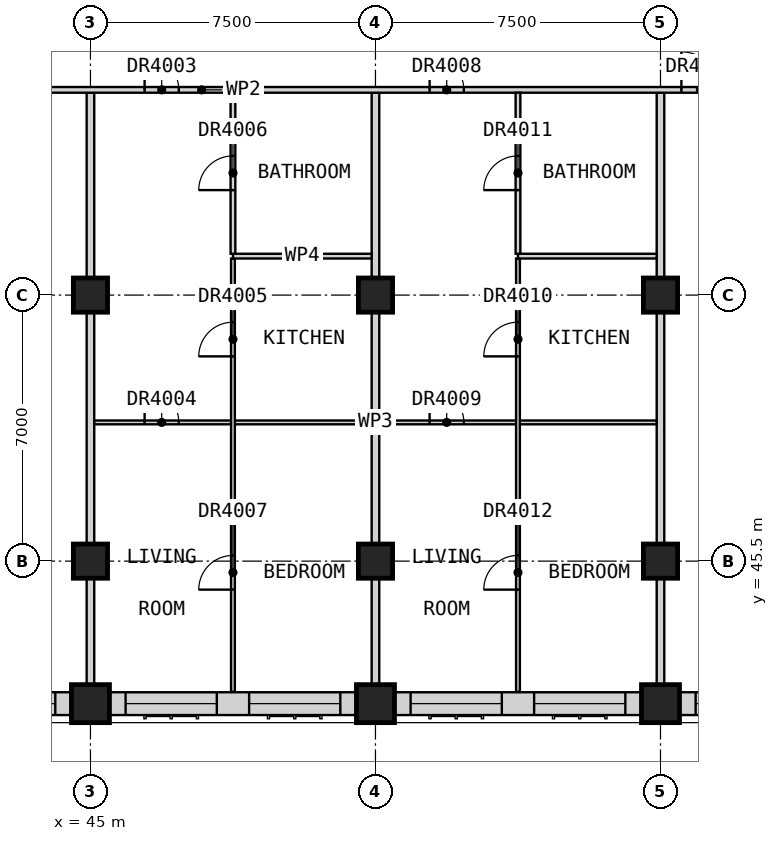
"""IFC4 building model, lengths in metres.
Left out: names, types, materials, properties, quantities, classifications, styles, units other than length and angle.
Written with IfcOpenShell. Run it as: python <this file> out.ifc"""

import sys

from ifc_helpers import new_model, si_unit, direction, frame, frame_2d, origin, origin_2d, place, context, subcontext, project, spatial, rectangle, extrude, element, fill, save


model = new_model("IFC4")
c1 = context("Model", 3, precision=1e-05, world=origin(), true_north=direction((0.0, 1.0)))
c2 = subcontext(c1, "Body", "Model", "MODEL_VIEW")
j1 = project(units=[si_unit("LENGTHUNIT", "METRE"), si_unit("PLANEANGLEUNIT", "RADIAN")], contexts=[c1])
p1 = place(None, origin())
s1 = spatial("IfcSite", under=j1, at=p1, CompositionType="ELEMENT")
p2 = place(p1, origin())
s2 = spatial("IfcBuilding", under=s1, at=p2, CompositionType="ELEMENT")
p3 = place(p2, frame((0.0, 0.0, 189.7)))
s3 = spatial("IfcBuildingStorey", under=s2, at=p3, CompositionType="ELEMENT", Elevation=189.7)
for number, where, z_axis, x_axis in (
    (1, (45.0, 41.75, 0.0), (0.0, 0.0, 1.0), (1.0, 0.0, 0.0)),
    (2, (52.5, 41.75, 0.0), (0.0, 0.0, 1.0), (1.0, 0.0, 0.0)),
    (3, (60.0, 41.75, 0.0), (0.0, 0.0, 1.0), (1.0, 0.0, 0.0)),
):
    element("IfcColumn", number, at=place(p3, frame(where, z_axis=z_axis, x_axis=x_axis)), inside=s3, PredefinedType="COLUMN", context=c2, shape_type="SweptSolid", body=[
        extrude(rectangle(XDim=1.0, YDim=1.0, at=origin_2d()), origin(), (0.0, 0.0, 1.0), 3.5),
    ])
for number, where, z_axis, x_axis in (
    (4, (45.0, 45.5, 0.0), (0.0, 0.0, 1.0), (1.0, 0.0, 0.0)),
    (5, (45.0, 52.5, 0.0), (0.0, 0.0, 1.0), (1.0, 0.0, 0.0)),
    (6, (52.5, 45.5, 0.0), (0.0, 0.0, 1.0), (1.0, 0.0, 0.0)),
    (7, (52.5, 52.5, 0.0), (0.0, 0.0, 1.0), (1.0, 0.0, 0.0)),
    (8, (60.0, 45.5, 0.0), (0.0, 0.0, 1.0), (1.0, 0.0, 0.0)),
    (9, (60.0, 52.5, 0.0), (0.0, 0.0, 1.0), (1.0, 0.0, 0.0)),
):
    element("IfcColumn", number, at=place(p3, frame(where, z_axis=z_axis, x_axis=x_axis)), inside=s3, PredefinedType="COLUMN", context=c2, shape_type="SweptSolid", body=[
        extrude(rectangle(XDim=0.9, YDim=0.9, at=origin_2d()), origin(), (0.0, 0.0, 1.0), 3.5),
    ])
p4 = place(p3, frame((38.0, 41.75, 0.0), z_axis=(0.0, 0.0, 1.0), x_axis=(1.0, 0.0, 0.0)))
e10 = element("IfcWall", 10, at=p4, inside=s3, PredefinedType="SOLIDWALL", context=c2, shape_type="SweptSolid", body=[
    extrude(rectangle(XDim=6.5, YDim=0.6, at=frame_2d((3.25, 0.0))), origin(), (0.0, 0.0, 1.0), 2.75),
])
p5 = place(p4, frame((0.425, 0.0, 0.8)))
e11 = element("IfcOpeningElement", 11, at=p5, cuts=e10, PredefinedType="OPENING", context=c2, shape_type="SweptSolid", body=[
    extrude(rectangle(XDim=2.4, YDim=1.8, at=frame_2d((1.2, 0.9))), frame((0.0, 0.31, 0.0), z_axis=(0.0, -1.0, 0.0), x_axis=(1.0, 0.0, 0.0)), (0.0, 0.0, 1.0), 0.62),
])
p6 = place(p4, frame((3.675, 0.0, 0.8)))
e12 = element("IfcOpeningElement", 12, at=p6, cuts=e10, PredefinedType="OPENING", context=c2, shape_type="SweptSolid", body=[
    extrude(rectangle(XDim=2.4, YDim=1.8, at=frame_2d((1.2, 0.9))), frame((0.0, 0.31, 0.0), z_axis=(0.0, -1.0, 0.0), x_axis=(1.0, 0.0, 0.0)), (0.0, 0.0, 1.0), 0.62),
])
p7 = place(p3, frame((45.5, 41.75, 0.0), z_axis=(0.0, 0.0, 1.0), x_axis=(1.0, 0.0, 0.0)))
e13 = element("IfcWall", 13, at=p7, inside=s3, PredefinedType="SOLIDWALL", context=c2, shape_type="SweptSolid", body=[
    extrude(rectangle(XDim=6.5, YDim=0.6, at=frame_2d((3.25, 0.0))), origin(), (0.0, 0.0, 1.0), 2.75),
])
p8 = place(p7, frame((0.425, 0.0, 0.8)))
e14 = element("IfcOpeningElement", 14, at=p8, cuts=e13, PredefinedType="OPENING", context=c2, shape_type="SweptSolid", body=[
    extrude(rectangle(XDim=2.4, YDim=1.8, at=frame_2d((1.2, 0.9))), frame((0.0, 0.31, 0.0), z_axis=(0.0, -1.0, 0.0), x_axis=(1.0, 0.0, 0.0)), (0.0, 0.0, 1.0), 0.62),
])
p9 = place(p7, frame((3.675, 0.0, 0.8)))
e15 = element("IfcOpeningElement", 15, at=p9, cuts=e13, PredefinedType="OPENING", context=c2, shape_type="SweptSolid", body=[
    extrude(rectangle(XDim=2.4, YDim=1.8, at=frame_2d((1.2, 0.9))), frame((0.0, 0.31, 0.0), z_axis=(0.0, -1.0, 0.0), x_axis=(1.0, 0.0, 0.0)), (0.0, 0.0, 1.0), 0.62),
])
p10 = place(p3, frame((53.0, 41.75, 0.0), z_axis=(0.0, 0.0, 1.0), x_axis=(1.0, 0.0, 0.0)))
e16 = element("IfcWall", 16, at=p10, inside=s3, PredefinedType="SOLIDWALL", context=c2, shape_type="SweptSolid", body=[
    extrude(rectangle(XDim=6.5, YDim=0.6, at=frame_2d((3.25, 0.0))), origin(), (0.0, 0.0, 1.0), 2.75),
])
p11 = place(p10, frame((0.425, 0.0, 0.8)))
e17 = element("IfcOpeningElement", 17, at=p11, cuts=e16, PredefinedType="OPENING", context=c2, shape_type="SweptSolid", body=[
    extrude(rectangle(XDim=2.4, YDim=1.8, at=frame_2d((1.2, 0.9))), frame((0.0, 0.31, 0.0), z_axis=(0.0, -1.0, 0.0), x_axis=(1.0, 0.0, 0.0)), (0.0, 0.0, 1.0), 0.62),
])
p12 = place(p10, frame((3.675, 0.0, 0.8)))
e18 = element("IfcOpeningElement", 18, at=p12, cuts=e16, PredefinedType="OPENING", context=c2, shape_type="SweptSolid", body=[
    extrude(rectangle(XDim=2.4, YDim=1.8, at=frame_2d((1.2, 0.9))), frame((0.0, 0.31, 0.0), z_axis=(0.0, -1.0, 0.0), x_axis=(1.0, 0.0, 0.0)), (0.0, 0.0, 1.0), 0.62),
])
p13 = place(p3, frame((60.5, 41.75, 0.0), z_axis=(0.0, 0.0, 1.0), x_axis=(1.0, 0.0, 0.0)))
e19 = element("IfcWall", 19, at=p13, inside=s3, PredefinedType="SOLIDWALL", context=c2, shape_type="SweptSolid", body=[
    extrude(rectangle(XDim=6.5, YDim=0.6, at=frame_2d((3.25, 0.0))), origin(), (0.0, 0.0, 1.0), 2.75),
])
p14 = place(p13, frame((0.425, 0.0, 0.8)))
e20 = element("IfcOpeningElement", 20, at=p14, cuts=e19, PredefinedType="OPENING", context=c2, shape_type="SweptSolid", body=[
    extrude(rectangle(XDim=2.4, YDim=1.8, at=frame_2d((1.2, 0.9))), frame((0.0, 0.31, 0.0), z_axis=(0.0, -1.0, 0.0), x_axis=(1.0, 0.0, 0.0)), (0.0, 0.0, 1.0), 0.62),
])
p15 = place(p13, frame((3.675, 0.0, 0.8)))
e21 = element("IfcOpeningElement", 21, at=p15, cuts=e19, PredefinedType="OPENING", context=c2, shape_type="SweptSolid", body=[
    extrude(rectangle(XDim=2.4, YDim=1.8, at=frame_2d((1.2, 0.9))), frame((0.0, 0.31, 0.0), z_axis=(0.0, -1.0, 0.0), x_axis=(1.0, 0.0, 0.0)), (0.0, 0.0, 1.0), 0.62),
])
for number, where, z_axis, x_axis in (
    (22, (45.0, 41.25, 0.0), (0.0, 0.0, 1.0), (0.0, 1.0, 0.0)),
    (23, (52.5, 41.25, 0.0), (0.0, 0.0, 1.0), (0.0, 1.0, 0.0)),
    (24, (60.0, 41.25, 0.0), (0.0, 0.0, 1.0), (0.0, 1.0, 0.0)),
):
    element("IfcWall", number, at=place(p3, frame(where, z_axis=z_axis, x_axis=x_axis)), inside=s3, PredefinedType="PARTITIONING", context=c2, shape_type="SweptSolid", body=[
        extrude(rectangle(XDim=16.575, YDim=0.2, at=frame_2d((8.288, 0.0))), origin(), (0.0, 0.0, 1.0), 3.25),
    ])
p16 = place(p3, frame((33.75, 57.9, 0.0), z_axis=(0.0, 0.0, 1.0), x_axis=(1.0, 0.0, 0.0)))
e25 = element("IfcWall", 25, at=p16, inside=s3, PredefinedType="PARTITIONING", context=c2, shape_type="SweptSolid", body=[
    extrude(rectangle(XDim=28.35, YDim=0.15, at=frame_2d((14.175, 0.0))), origin(), (0.0, 0.0, 1.0), 3.25),
])
p17 = place(p16, frame((5.125, 0.0, 0.0)))
e26 = element("IfcOpeningElement", 26, at=p17, cuts=e25, PredefinedType="OPENING", context=c2, shape_type="SweptSolid", body=[
    extrude(rectangle(XDim=1.0, YDim=2.1, at=frame_2d((0.5, 1.05))), frame((0.0, 0.085, 0.0), z_axis=(0.0, -1.0, 0.0), x_axis=(1.0, 0.0, 0.0)), (0.0, 0.0, 1.0), 0.17),
])
p18 = place(p16, frame((12.675, 0.0, 0.0)))
e27 = element("IfcOpeningElement", 27, at=p18, cuts=e25, PredefinedType="OPENING", context=c2, shape_type="SweptSolid", body=[
    extrude(rectangle(XDim=0.9, YDim=2.1, at=frame_2d((0.45, 1.05))), frame((0.0, 0.085, 0.0), z_axis=(0.0, -1.0, 0.0), x_axis=(1.0, 0.0, 0.0)), (0.0, 0.0, 1.0), 0.17),
])
p19 = place(p16, frame((20.175, 0.0, 0.0)))
e28 = element("IfcOpeningElement", 28, at=p19, cuts=e25, PredefinedType="OPENING", context=c2, shape_type="SweptSolid", body=[
    extrude(rectangle(XDim=0.9, YDim=2.1, at=frame_2d((0.45, 1.05))), frame((0.0, 0.085, 0.0), z_axis=(0.0, -1.0, 0.0), x_axis=(1.0, 0.0, 0.0)), (0.0, 0.0, 1.0), 0.17),
])
p20 = place(p16, frame((26.8, 0.0, 0.0)))
e29 = element("IfcOpeningElement", 29, at=p20, cuts=e25, PredefinedType="OPENING", context=c2, shape_type="SweptSolid", body=[
    extrude(rectangle(XDim=1.0, YDim=2.1, at=frame_2d((0.5, 1.05))), frame((0.0, 0.085, 0.0), z_axis=(0.0, -1.0, 0.0), x_axis=(1.0, 0.0, 0.0)), (0.0, 0.0, 1.0), 0.17),
])
p21 = place(p3, frame((45.1, 49.15, 0.0), z_axis=(0.0, 0.0, 1.0), x_axis=(1.0, 0.0, 0.0)))
e30 = element("IfcWall", 30, at=p21, inside=s3, PredefinedType="PARTITIONING", context=c2, shape_type="SweptSolid", body=[
    extrude(rectangle(XDim=14.8, YDim=0.1, at=frame_2d((7.4, 0.0))), origin(), (0.0, 0.0, 1.0), 3.25),
])
p22 = place(p21, frame((1.325, 0.0, 0.0)))
e31 = element("IfcOpeningElement", 31, at=p22, cuts=e30, PredefinedType="OPENING", context=c2, shape_type="SweptSolid", body=[
    extrude(rectangle(XDim=0.9, YDim=2.1, at=frame_2d((0.45, 1.05))), frame((0.0, 0.06, 0.0), z_axis=(0.0, -1.0, 0.0), x_axis=(1.0, 0.0, 0.0)), (0.0, 0.0, 1.0), 0.12),
])
p23 = place(p21, frame((8.825, 0.0, 0.0)))
e32 = element("IfcOpeningElement", 32, at=p23, cuts=e30, PredefinedType="OPENING", context=c2, shape_type="SweptSolid", body=[
    extrude(rectangle(XDim=0.9, YDim=2.1, at=frame_2d((0.45, 1.05))), frame((0.0, 0.06, 0.0), z_axis=(0.0, -1.0, 0.0), x_axis=(1.0, 0.0, 0.0)), (0.0, 0.0, 1.0), 0.12),
])
p24 = place(p3, frame((48.75, 42.06, 0.0), z_axis=(0.0, 0.0, 1.0), x_axis=(0.0, 1.0, 0.0)))
e33 = element("IfcWall", 33, at=p24, inside=s3, PredefinedType="PARTITIONING", context=c2, shape_type="SweptSolid", body=[
    extrude(rectangle(XDim=11.402, YDim=0.1, at=frame_2d((5.701, 0.0))), origin(), (0.0, 0.0, 1.0), 3.25),
])
p25 = place(p24, frame((8.827, 0.0, 0.0)))
e34 = element("IfcOpeningElement", 34, at=p25, cuts=e33, PredefinedType="OPENING", context=c2, shape_type="SweptSolid", body=[
    extrude(rectangle(XDim=0.9, YDim=2.1, at=frame_2d((0.45, 1.05))), frame((0.0, 0.06, 0.0), z_axis=(0.0, -1.0, 0.0), x_axis=(1.0, 0.0, 0.0)), (0.0, 0.0, 1.0), 0.12),
])
p26 = place(p24, frame((2.69, 0.0, 0.0)))
e35 = element("IfcOpeningElement", 35, at=p26, cuts=e33, PredefinedType="OPENING", context=c2, shape_type="SweptSolid", body=[
    extrude(rectangle(XDim=0.9, YDim=2.1, at=frame_2d((0.45, 1.05))), frame((0.0, 0.06, 0.0), z_axis=(0.0, -1.0, 0.0), x_axis=(1.0, 0.0, 0.0)), (0.0, 0.0, 1.0), 0.12),
])
p27 = place(p3, frame((56.25, 42.06, 0.0), z_axis=(0.0, 0.0, 1.0), x_axis=(0.0, 1.0, 0.0)))
e36 = element("IfcWall", 36, at=p27, inside=s3, PredefinedType="PARTITIONING", context=c2, shape_type="SweptSolid", body=[
    extrude(rectangle(XDim=11.402, YDim=0.1, at=frame_2d((5.701, 0.0))), origin(), (0.0, 0.0, 1.0), 3.25),
])
p28 = place(p27, frame((8.827, 0.0, 0.0)))
e37 = element("IfcOpeningElement", 37, at=p28, cuts=e36, PredefinedType="OPENING", context=c2, shape_type="SweptSolid", body=[
    extrude(rectangle(XDim=0.9, YDim=2.1, at=frame_2d((0.45, 1.05))), frame((0.0, 0.06, 0.0), z_axis=(0.0, -1.0, 0.0), x_axis=(1.0, 0.0, 0.0)), (0.0, 0.0, 1.0), 0.12),
])
p29 = place(p27, frame((2.69, 0.0, 0.0)))
e38 = element("IfcOpeningElement", 38, at=p29, cuts=e36, PredefinedType="OPENING", context=c2, shape_type="SweptSolid", body=[
    extrude(rectangle(XDim=0.9, YDim=2.1, at=frame_2d((0.45, 1.05))), frame((0.0, 0.06, 0.0), z_axis=(0.0, -1.0, 0.0), x_axis=(1.0, 0.0, 0.0)), (0.0, 0.0, 1.0), 0.12),
])
for number, where, z_axis, x_axis in (
    (39, (48.75, 53.525, 0.0), (0.0, 0.0, 1.0), (1.0, 0.0, 0.0)),
    (40, (56.25, 53.525, 0.0), (0.0, 0.0, 1.0), (1.0, 0.0, 0.0)),
):
    element("IfcWall", number, at=place(p3, frame(where, z_axis=z_axis, x_axis=x_axis)), inside=s3, PredefinedType="PARTITIONING", context=c2, shape_type="SweptSolid", body=[
        extrude(rectangle(XDim=3.65, YDim=0.125, at=frame_2d((1.825, 0.0))), origin(), (0.0, 0.0, 1.0), 3.25),
    ])
p30 = place(p3, frame((48.75, 53.587, 0.0), z_axis=(0.0, 0.0, 1.0), x_axis=(0.0, 1.0, 0.0)))
e41 = element("IfcWall", 41, at=p30, inside=s3, PredefinedType="PARTITIONING", context=c2, shape_type="SweptSolid", body=[
    extrude(rectangle(XDim=4.238, YDim=0.125, at=frame_2d((2.119, 0.0))), origin(), (0.0, 0.0, 1.0), 3.25),
])
p31 = place(p30, frame((1.675, 0.0, 0.0)))
e42 = element("IfcOpeningElement", 42, at=p31, cuts=e41, PredefinedType="OPENING", context=c2, shape_type="SweptSolid", body=[
    extrude(rectangle(XDim=0.9, YDim=2.1, at=frame_2d((0.45, 1.05))), frame((0.0, 0.073, 0.0), z_axis=(0.0, -1.0, 0.0), x_axis=(1.0, 0.0, 0.0)), (0.0, 0.0, 1.0), 0.145),
])
p32 = place(p3, frame((56.25, 53.587, 0.0), z_axis=(0.0, 0.0, 1.0), x_axis=(0.0, 1.0, 0.0)))
e43 = element("IfcWall", 43, at=p32, inside=s3, PredefinedType="PARTITIONING", context=c2, shape_type="SweptSolid", body=[
    extrude(rectangle(XDim=4.238, YDim=0.125, at=frame_2d((2.119, 0.0))), origin(), (0.0, 0.0, 1.0), 3.25),
])
p33 = place(p32, frame((1.675, 0.0, 0.0)))
e44 = element("IfcOpeningElement", 44, at=p33, cuts=e43, PredefinedType="OPENING", context=c2, shape_type="SweptSolid", body=[
    extrude(rectangle(XDim=0.9, YDim=2.1, at=frame_2d((0.45, 1.05))), frame((0.0, 0.073, 0.0), z_axis=(0.0, -1.0, 0.0), x_axis=(1.0, 0.0, 0.0)), (0.0, 0.0, 1.0), 0.145),
])
p34 = place(p6, origin())
e45 = element("IfcWindow", 45, at=p34, inside=s3, PartitioningType="SINGLE_PANEL", PredefinedType="WINDOW", context=c2, shape_type="SweptSolid", body=[
    extrude(rectangle(XDim=2.4, YDim=1.8, at=frame_2d((1.2, 0.9))), frame((0.0, -0.07, 0.0), z_axis=(0.0, -1.0, 0.0), x_axis=(1.0, 0.0, 0.0)), (0.0, 0.0, 1.0), 0.06),
])
fill(e12, e45)
p35 = place(p8, origin())
e46 = element("IfcWindow", 46, at=p35, inside=s3, PartitioningType="SINGLE_PANEL", PredefinedType="WINDOW", context=c2, shape_type="SweptSolid", body=[
    extrude(rectangle(XDim=2.4, YDim=1.8, at=frame_2d((1.2, 0.9))), frame((0.0, -0.07, 0.0), z_axis=(0.0, -1.0, 0.0), x_axis=(1.0, 0.0, 0.0)), (0.0, 0.0, 1.0), 0.06),
])
fill(e14, e46)
p36 = place(p9, origin())
e47 = element("IfcWindow", 47, at=p36, inside=s3, PartitioningType="SINGLE_PANEL", PredefinedType="WINDOW", context=c2, shape_type="SweptSolid", body=[
    extrude(rectangle(XDim=2.4, YDim=1.8, at=frame_2d((1.2, 0.9))), frame((0.0, -0.07, 0.0), z_axis=(0.0, -1.0, 0.0), x_axis=(1.0, 0.0, 0.0)), (0.0, 0.0, 1.0), 0.06),
])
fill(e15, e47)
p37 = place(p11, origin())
e48 = element("IfcWindow", 48, at=p37, inside=s3, PartitioningType="SINGLE_PANEL", PredefinedType="WINDOW", context=c2, shape_type="SweptSolid", body=[
    extrude(rectangle(XDim=2.4, YDim=1.8, at=frame_2d((1.2, 0.9))), frame((0.0, -0.07, 0.0), z_axis=(0.0, -1.0, 0.0), x_axis=(1.0, 0.0, 0.0)), (0.0, 0.0, 1.0), 0.06),
])
fill(e17, e48)
p38 = place(p12, origin())
e49 = element("IfcWindow", 49, at=p38, inside=s3, PartitioningType="SINGLE_PANEL", PredefinedType="WINDOW", context=c2, shape_type="SweptSolid", body=[
    extrude(rectangle(XDim=2.4, YDim=1.8, at=frame_2d((1.2, 0.9))), frame((0.0, -0.07, 0.0), z_axis=(0.0, -1.0, 0.0), x_axis=(1.0, 0.0, 0.0)), (0.0, 0.0, 1.0), 0.06),
])
fill(e18, e49)
p39 = place(p14, origin())
e50 = element("IfcWindow", 50, at=p39, inside=s3, PartitioningType="SINGLE_PANEL", PredefinedType="WINDOW", context=c2, shape_type="SweptSolid", body=[
    extrude(rectangle(XDim=2.4, YDim=1.8, at=frame_2d((1.2, 0.9))), frame((0.0, -0.07, 0.0), z_axis=(0.0, -1.0, 0.0), x_axis=(1.0, 0.0, 0.0)), (0.0, 0.0, 1.0), 0.06),
])
fill(e20, e50)
p40 = place(p18, origin())
e51 = element("IfcDoor", 51, at=p40, inside=s3, OperationType="SINGLE_SWING_RIGHT", PredefinedType="DOOR", context=c2, shape_type="SweptSolid", body=[
    extrude(rectangle(XDim=0.9, YDim=2.1, at=frame_2d((0.45, 1.05))), frame((0.0, 0.025, 0.0), z_axis=(0.0, -1.0, 0.0), x_axis=(1.0, 0.0, 0.0)), (0.0, 0.0, 1.0), 0.05),
])
fill(e27, e51)
p41 = place(p22, origin())
e52 = element("IfcDoor", 52, at=p41, inside=s3, OperationType="SINGLE_SWING_LEFT", PredefinedType="DOOR", context=c2, shape_type="SweptSolid", body=[
    extrude(rectangle(XDim=0.9, YDim=2.1, at=frame_2d((0.45, 1.05))), frame((0.0, 0.025, 0.0), z_axis=(0.0, -1.0, 0.0), x_axis=(1.0, 0.0, 0.0)), (0.0, 0.0, 1.0), 0.05),
])
fill(e31, e52)
p42 = place(p25, origin())
e53 = element("IfcDoor", 53, at=p42, inside=s3, OperationType="SINGLE_SWING_RIGHT", PredefinedType="DOOR", context=c2, shape_type="SweptSolid", body=[
    extrude(rectangle(XDim=0.9, YDim=2.1, at=frame_2d((0.45, 1.05))), frame((0.0, 0.025, 0.0), z_axis=(0.0, -1.0, 0.0), x_axis=(1.0, 0.0, 0.0)), (0.0, 0.0, 1.0), 0.05),
])
fill(e34, e53)
p43 = place(p31, origin())
e54 = element("IfcDoor", 54, at=p43, inside=s3, OperationType="SINGLE_SWING_RIGHT", PredefinedType="DOOR", context=c2, shape_type="SweptSolid", body=[
    extrude(rectangle(XDim=0.9, YDim=2.1, at=frame_2d((0.45, 1.05))), frame((0.0, 0.025, 0.0), z_axis=(0.0, -1.0, 0.0), x_axis=(1.0, 0.0, 0.0)), (0.0, 0.0, 1.0), 0.05),
])
fill(e42, e54)
p44 = place(p26, origin())
e55 = element("IfcDoor", 55, at=p44, inside=s3, OperationType="SINGLE_SWING_LEFT", PredefinedType="DOOR", context=c2, shape_type="SweptSolid", body=[
    extrude(rectangle(XDim=0.9, YDim=2.1, at=frame_2d((0.45, 1.05))), frame((0.0, 0.025, 0.0), z_axis=(0.0, -1.0, 0.0), x_axis=(1.0, 0.0, 0.0)), (0.0, 0.0, 1.0), 0.05),
])
fill(e35, e55)
p45 = place(p19, origin())
e56 = element("IfcDoor", 56, at=p45, inside=s3, OperationType="SINGLE_SWING_RIGHT", PredefinedType="DOOR", context=c2, shape_type="SweptSolid", body=[
    extrude(rectangle(XDim=0.9, YDim=2.1, at=frame_2d((0.45, 1.05))), frame((0.0, 0.025, 0.0), z_axis=(0.0, -1.0, 0.0), x_axis=(1.0, 0.0, 0.0)), (0.0, 0.0, 1.0), 0.05),
])
fill(e28, e56)
p46 = place(p23, origin())
e57 = element("IfcDoor", 57, at=p46, inside=s3, OperationType="SINGLE_SWING_LEFT", PredefinedType="DOOR", context=c2, shape_type="SweptSolid", body=[
    extrude(rectangle(XDim=0.9, YDim=2.1, at=frame_2d((0.45, 1.05))), frame((0.0, 0.025, 0.0), z_axis=(0.0, -1.0, 0.0), x_axis=(1.0, 0.0, 0.0)), (0.0, 0.0, 1.0), 0.05),
])
fill(e32, e57)
p47 = place(p28, origin())
e58 = element("IfcDoor", 58, at=p47, inside=s3, OperationType="SINGLE_SWING_RIGHT", PredefinedType="DOOR", context=c2, shape_type="SweptSolid", body=[
    extrude(rectangle(XDim=0.9, YDim=2.1, at=frame_2d((0.45, 1.05))), frame((0.0, 0.025, 0.0), z_axis=(0.0, -1.0, 0.0), x_axis=(1.0, 0.0, 0.0)), (0.0, 0.0, 1.0), 0.05),
])
fill(e37, e58)
p48 = place(p33, origin())
e59 = element("IfcDoor", 59, at=p48, inside=s3, OperationType="SINGLE_SWING_RIGHT", PredefinedType="DOOR", context=c2, shape_type="SweptSolid", body=[
    extrude(rectangle(XDim=0.9, YDim=2.1, at=frame_2d((0.45, 1.05))), frame((0.0, 0.025, 0.0), z_axis=(0.0, -1.0, 0.0), x_axis=(1.0, 0.0, 0.0)), (0.0, 0.0, 1.0), 0.05),
])
fill(e44, e59)
p49 = place(p29, origin())
e60 = element("IfcDoor", 60, at=p49, inside=s3, OperationType="SINGLE_SWING_LEFT", PredefinedType="DOOR", context=c2, shape_type="SweptSolid", body=[
    extrude(rectangle(XDim=0.9, YDim=2.1, at=frame_2d((0.45, 1.05))), frame((0.0, 0.025, 0.0), z_axis=(0.0, -1.0, 0.0), x_axis=(1.0, 0.0, 0.0)), (0.0, 0.0, 1.0), 0.05),
])
fill(e38, e60)
p50 = place(p20, origin())
e61 = element("IfcDoor", 61, at=p50, inside=s3, OperationType="SINGLE_SWING_RIGHT", PredefinedType="DOOR", context=c2, shape_type="SweptSolid", body=[
    extrude(rectangle(XDim=1.0, YDim=2.1, at=frame_2d((0.5, 1.05))), frame((0.0, 0.025, 0.0), z_axis=(0.0, -1.0, 0.0), x_axis=(1.0, 0.0, 0.0)), (0.0, 0.0, 1.0), 0.05),
])
fill(e29, e61)
save(model, sys.argv[1])
